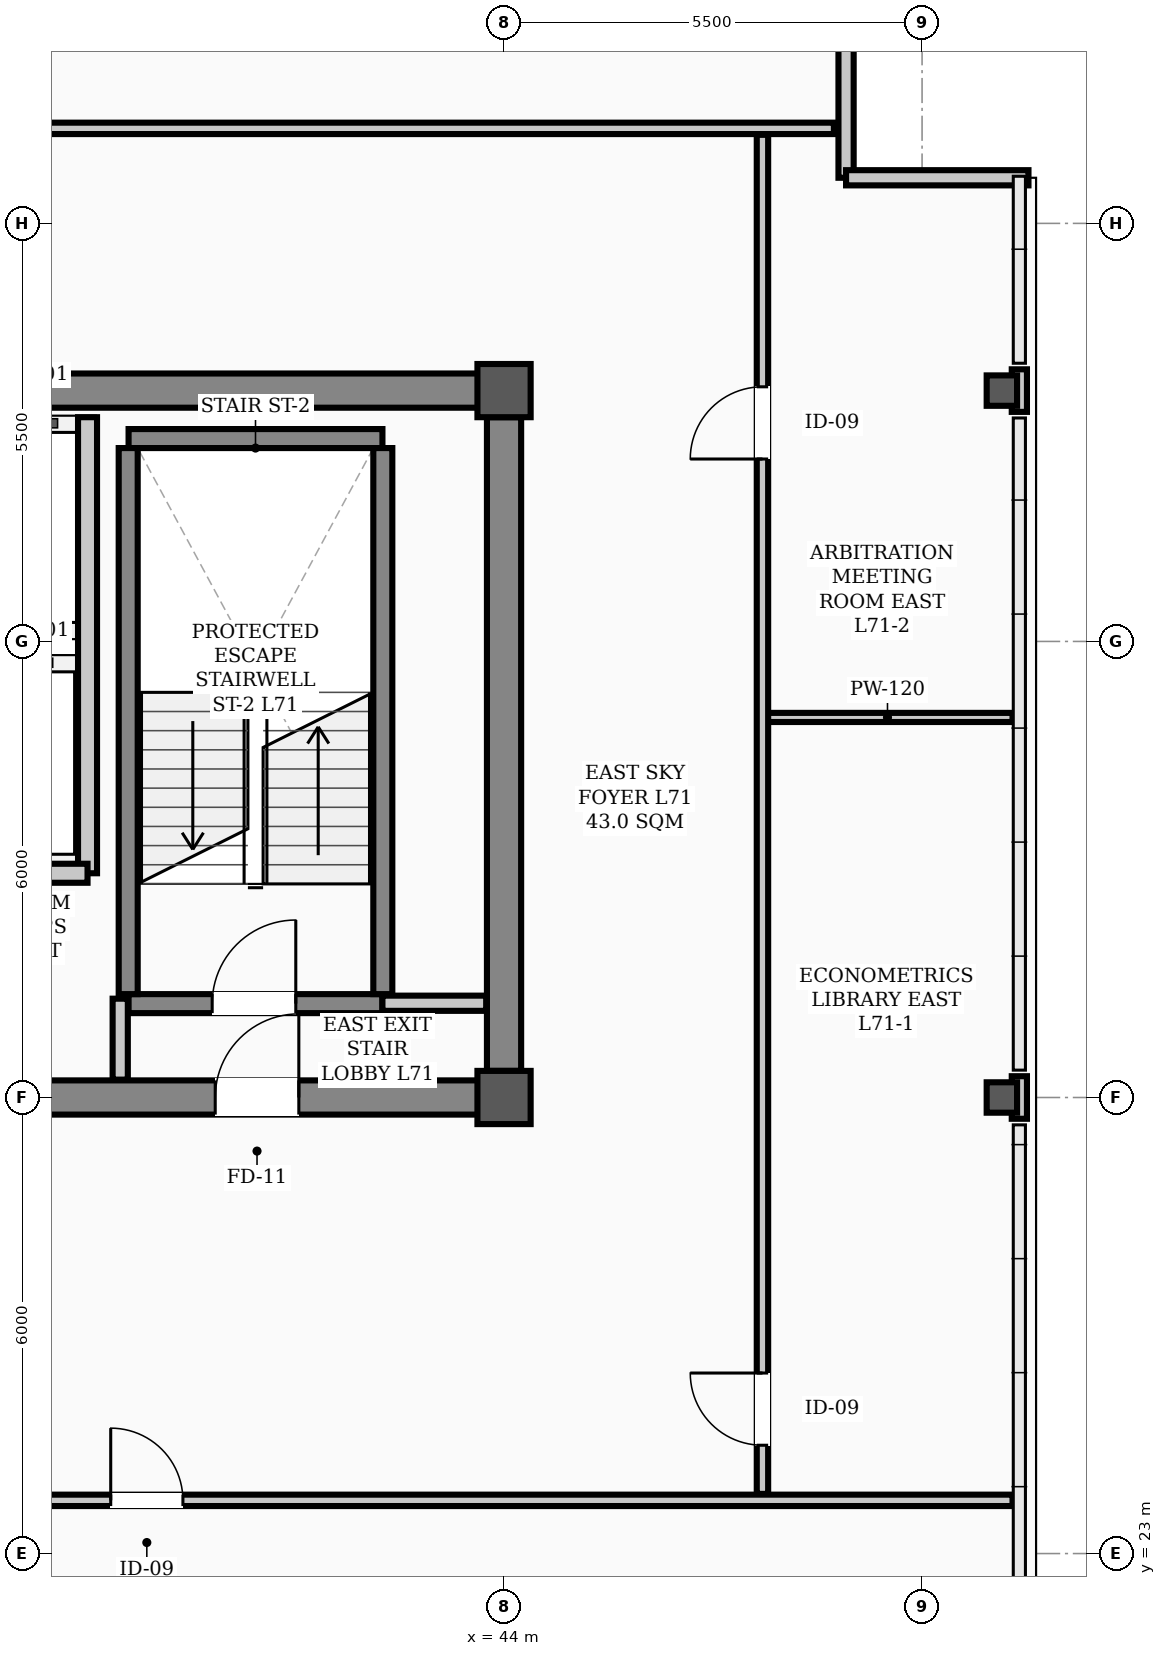
"""IFC4 building model, lengths in metres.
Left out: names, types, materials, properties, quantities, classifications, styles, units other than length and angle.
Written with IfcOpenShell. Run it as: python <this file> out.ifc"""

import sys

from ifc_helpers import new_model, si_unit, direction, frame, frame_2d, origin, origin_2d, place, context, subcontext, project, spatial, rectangle, hollow_rectangle, extrude, element, fill, save


model = new_model("IFC4")
c1 = context("Model", 3, precision=1e-05, world=origin(), true_north=direction((0.0, 1.0)))
c2 = subcontext(c1, "Body", "Model", "MODEL_VIEW")
j1 = project(units=[si_unit("LENGTHUNIT", "METRE"), si_unit("PLANEANGLEUNIT", "RADIAN")], contexts=[c1])
p1 = place(None, origin())
s1 = spatial("IfcSite", under=j1, at=p1, CompositionType="ELEMENT")
p2 = place(p1, origin())
s2 = spatial("IfcBuilding", under=s1, at=p2, CompositionType="ELEMENT")
p3 = place(p2, frame((0.0, 0.0, 285.2)))
s3 = spatial("IfcBuildingStorey", under=s2, at=p3, CompositionType="ELEMENT", Elevation=285.2)
for number, where, z_axis, x_axis in (
    (1, (44.0, 29.0, 0.0), (0.0, 0.0, 1.0), (1.0, 0.0, 0.0)),
    (2, (44.0, 38.3, 0.0), (0.0, 0.0, 1.0), (1.0, 0.0, 0.0)),
):
    element("IfcColumn", number, at=place(p3, frame(where, z_axis=z_axis, x_axis=x_axis)), inside=s3, PredefinedType="COLUMN", context=c2, shape_type="SweptSolid", body=[
        extrude(hollow_rectangle(XDim=0.7, YDim=0.7, WallThickness=0.028, InnerFilletRadius=0.014, OuterFilletRadius=0.042, at=origin_2d()), origin(), (0.0, 0.0, 1.0), 3.9),
    ])
for number, where, z_axis, x_axis in (
    (3, (50.55, 29.0, 0.0), (0.0, 0.0, 1.0), (1.0, 0.0, 0.0)),
    (4, (50.55, 38.3, 0.0), (0.0, 0.0, 1.0), (1.0, 0.0, 0.0)),
):
    element("IfcColumn", number, at=place(p3, frame(where, z_axis=z_axis, x_axis=x_axis)), inside=s3, PredefinedType="COLUMN", context=c2, shape_type="SweptSolid", body=[
        extrude(hollow_rectangle(XDim=0.4, YDim=0.4, WallThickness=0.02, InnerFilletRadius=0.02, OuterFilletRadius=0.04, at=origin_2d()), origin(), (0.0, 0.0, 1.0), 3.9),
    ])
for number, where, z_axis, x_axis in (
    (5, (50.78, 28.72, 0.0), (0.0, 0.0, 1.0), (0.0, 1.0, 0.0)),
    (6, (50.78, 38.02, 0.0), (0.0, 0.0, 1.0), (0.0, 1.0, 0.0)),
):
    element("IfcWall", number, at=place(p3, frame(where, z_axis=z_axis, x_axis=x_axis)), inside=s3, PredefinedType="PARAPET", context=c2, shape_type="SweptSolid", body=[
        extrude(rectangle(XDim=0.56, YDim=0.2, at=frame_2d((0.28, 0.0))), origin(), (0.0, 0.0, 1.0), 1.2),
    ])
for number, where, z_axis, x_axis in (
    (7, (48.5, 43.5, 0.0), (0.0, 0.0, 1.0), (0.0, -1.0, 0.0)),
    (8, (48.5, 41.1, 0.0), (0.0, 0.0, 1.0), (1.0, 0.0, 0.0)),
):
    element("IfcWall", number, at=place(p3, frame(where, z_axis=z_axis, x_axis=x_axis)), inside=s3, PredefinedType="PARAPET", context=c2, shape_type="SweptSolid", body=[
        extrude(rectangle(XDim=2.4, YDim=0.2, at=frame_2d((1.2, 0.0))), origin(), (0.0, 0.0, 1.0), 1.2),
    ])
p4 = place(p3, frame((13.5, 29.0, 0.0), z_axis=(0.0, 0.0, 1.0), x_axis=(1.0, 0.0, 0.0)))
e9 = element("IfcWall", 9, at=p4, inside=s3, PredefinedType="SHEAR", context=c2, shape_type="SweptSolid", body=[
    extrude(rectangle(XDim=30.5, YDim=0.45, at=frame_2d((15.25, 0.0))), origin(), (0.0, 0.0, 1.0), 3.72),
])
p5 = place(p4, frame((1.75, 0.0, 0.0)))
e10 = element("IfcOpeningElement", 10, at=p5, cuts=e9, PredefinedType="OPENING", context=c2, shape_type="SweptSolid", body=[
    extrude(rectangle(XDim=1.1, YDim=2.08, at=frame_2d((0.55, 1.04))), frame((0.0, 0.235, 0.0), z_axis=(0.0, -1.0, 0.0), x_axis=(1.0, 0.0, 0.0)), (0.0, 0.0, 1.0), 0.47),
])
p6 = place(p4, frame((26.7, 0.0, 0.0)))
e11 = element("IfcOpeningElement", 11, at=p6, cuts=e9, PredefinedType="OPENING", context=c2, shape_type="SweptSolid", body=[
    extrude(rectangle(XDim=1.1, YDim=2.08, at=frame_2d((0.55, 1.04))), frame((0.0, 0.235, 0.0), z_axis=(0.0, -1.0, 0.0), x_axis=(1.0, 0.0, 0.0)), (0.0, 0.0, 1.0), 0.47),
])
p7 = place(p4, frame((6.8, 0.0, 0.0)))
e12 = element("IfcOpeningElement", 12, at=p7, cuts=e9, PredefinedType="OPENING", context=c2, shape_type="SweptSolid", body=[
    extrude(rectangle(XDim=1.1, YDim=2.08, at=frame_2d((0.55, 1.04))), frame((0.0, 0.235, 0.0), z_axis=(0.0, -1.0, 0.0), x_axis=(1.0, 0.0, 0.0)), (0.0, 0.0, 1.0), 0.47),
])
p8 = place(p4, frame((13.2, 0.0, 0.0)))
e13 = element("IfcOpeningElement", 13, at=p8, cuts=e9, PredefinedType="OPENING", context=c2, shape_type="SweptSolid", body=[
    extrude(rectangle(XDim=1.6, YDim=2.08, at=frame_2d((0.8, 1.04))), frame((0.0, 0.235, 0.0), z_axis=(0.0, -1.0, 0.0), x_axis=(1.0, 0.0, 0.0)), (0.0, 0.0, 1.0), 0.47),
])
p9 = place(p4, frame((19.6, 0.0, 0.0)))
e14 = element("IfcOpeningElement", 14, at=p9, cuts=e9, PredefinedType="OPENING", context=c2, shape_type="SweptSolid", body=[
    extrude(rectangle(XDim=0.9, YDim=2.08, at=frame_2d((0.45, 1.04))), frame((0.0, 0.235, 0.0), z_axis=(0.0, -1.0, 0.0), x_axis=(1.0, 0.0, 0.0)), (0.0, 0.0, 1.0), 0.47),
])
p10 = place(p4, frame((21.6, 0.0, 0.0)))
e15 = element("IfcOpeningElement", 15, at=p10, cuts=e9, PredefinedType="OPENING", context=c2, shape_type="SweptSolid", body=[
    extrude(rectangle(XDim=0.9, YDim=2.08, at=frame_2d((0.45, 1.04))), frame((0.0, 0.235, 0.0), z_axis=(0.0, -1.0, 0.0), x_axis=(1.0, 0.0, 0.0)), (0.0, 0.0, 1.0), 0.47),
])
p11 = place(p3, frame((13.5, 38.3, 0.0), z_axis=(0.0, 0.0, 1.0), x_axis=(1.0, 0.0, 0.0)))
e16 = element("IfcWall", 16, at=p11, inside=s3, PredefinedType="SHEAR", context=c2, shape_type="SweptSolid", body=[
    extrude(rectangle(XDim=30.5, YDim=0.45, at=frame_2d((15.25, 0.0))), origin(), (0.0, 0.0, 1.0), 3.72),
])
p12 = place(p3, frame((44.0, 29.35, 0.0), z_axis=(0.0, 0.0, 1.0), x_axis=(0.0, 1.0, 0.0)))
e17 = element("IfcWall", 17, at=p12, inside=s3, PredefinedType="SHEAR", context=c2, shape_type="SweptSolid", body=[
    extrude(rectangle(XDim=8.6, YDim=0.45, at=frame_2d((4.3, 0.0))), origin(), (0.0, 0.0, 1.0), 3.72),
])
p13 = place(p3, frame((39.06, 30.235, 0.0), z_axis=(0.0, 0.0, 1.0), x_axis=(1.0, 0.0, 0.0)))
e18 = element("IfcWall", 18, at=p13, inside=s3, PredefinedType="STANDARD", context=c2, shape_type="SweptSolid", body=[
    extrude(rectangle(XDim=3.34, YDim=0.25, at=frame_2d((1.67, 0.0))), origin(), (0.0, 0.0, 1.0), 3.72),
])
p14 = place(p13, frame((1.1, 0.0, 0.0)))
e19 = element("IfcOpeningElement", 19, at=p14, cuts=e18, PredefinedType="OPENING", context=c2, shape_type="SweptSolid", body=[
    extrude(rectangle(XDim=1.1, YDim=2.08, at=frame_2d((0.55, 1.04))), frame((0.0, 0.135, 0.0), z_axis=(0.0, -1.0, 0.0), x_axis=(1.0, 0.0, 0.0)), (0.0, 0.0, 1.0), 0.27),
])
p15 = place(p3, frame((39.06, 37.669, 0.0), z_axis=(0.0, 0.0, 1.0), x_axis=(1.0, 0.0, 0.0)))
e20 = element("IfcWall", 20, at=p15, inside=s3, PredefinedType="STANDARD", context=c2, shape_type="SweptSolid", body=[
    extrude(rectangle(XDim=3.34, YDim=0.25, at=frame_2d((1.67, 0.0))), origin(), (0.0, 0.0, 1.0), 3.72),
])
for number, where, z_axis, x_axis in (
    (21, (39.055, 30.36, 0.0), (0.0, 0.0, 1.0), (0.0, 1.0, 0.0)),
    (22, (42.405, 30.36, 0.0), (0.0, 0.0, 1.0), (0.0, 1.0, 0.0)),
):
    element("IfcWall", number, at=place(p3, frame(where, z_axis=z_axis, x_axis=x_axis)), inside=s3, PredefinedType="STANDARD", context=c2, shape_type="SweptSolid", body=[
        extrude(rectangle(XDim=7.184, YDim=0.25, at=frame_2d((3.592, 0.0))), origin(), (0.0, 0.0, 1.0), 3.72),
    ])
p16 = place(p3, frame((38.52, 31.95, 0.0), z_axis=(0.0, 0.0, 1.0), x_axis=(0.0, 1.0, 0.0)))
e23 = element("IfcWall", 23, at=p16, inside=s3, PredefinedType="STANDARD", context=c2, shape_type="SweptSolid", body=[
    extrude(rectangle(XDim=6.0, YDim=0.25, at=frame_2d((3.0, 0.0))), origin(), (0.0, 0.0, 1.0), 3.4),
])
p17 = place(p3, frame((36.62, 31.95, 0.0), z_axis=(0.0, 0.0, 1.0), x_axis=(1.0, 0.0, 0.0)))
e24 = element("IfcWall", 24, at=p17, inside=s3, PredefinedType="STANDARD", context=c2, shape_type="SweptSolid", body=[
    extrude(rectangle(XDim=1.9, YDim=0.25, at=frame_2d((0.95, 0.0))), origin(), (0.0, 0.0, 1.0), 3.48),
])
p18 = place(p3, frame((42.4, 30.24, 0.0), z_axis=(0.0, 0.0, 1.0), x_axis=(1.0, 0.0, 0.0)))
e25 = element("IfcWall", 25, at=p18, inside=s3, PredefinedType="STANDARD", context=c2, shape_type="SweptSolid", body=[
    extrude(rectangle(XDim=1.365, YDim=0.2, at=frame_2d((0.683, 0.0))), origin(), (0.0, 0.0, 1.0), 3.2),
])
p19 = place(p3, frame((12.31, 23.7, 0.0), z_axis=(0.0, 0.0, 1.0), x_axis=(1.0, 0.0, 0.0)))
e26 = element("IfcWall", 26, at=p19, inside=s3, PredefinedType="PARTITIONING", context=c2, shape_type="SweptSolid", body=[
    extrude(rectangle(XDim=38.38, YDim=0.15, at=frame_2d((19.19, 0.0))), origin(), (0.0, 0.0, 1.0), 3.2),
])
p20 = place(p19, frame((8.97, 0.0, 0.0)))
e27 = element("IfcOpeningElement", 27, at=p20, cuts=e26, PredefinedType="OPENING", context=c2, shape_type="SweptSolid", body=[
    extrude(rectangle(XDim=0.95, YDim=2.08, at=frame_2d((0.475, 1.04))), frame((0.0, 0.085, 0.0), z_axis=(0.0, -1.0, 0.0), x_axis=(1.0, 0.0, 0.0)), (0.0, 0.0, 1.0), 0.17),
])
p21 = place(p19, frame((26.515, 0.0, 0.0)))
e28 = element("IfcOpeningElement", 28, at=p21, cuts=e26, PredefinedType="OPENING", context=c2, shape_type="SweptSolid", body=[
    extrude(rectangle(XDim=0.95, YDim=2.08, at=frame_2d((0.475, 1.04))), frame((0.0, 0.085, 0.0), z_axis=(0.0, -1.0, 0.0), x_axis=(1.0, 0.0, 0.0)), (0.0, 0.0, 1.0), 0.17),
])
p22 = place(p3, frame((47.4, 34.0, 0.0), z_axis=(0.0, 0.0, 1.0), x_axis=(1.0, 0.0, 0.0)))
e29 = element("IfcWall", 29, at=p22, inside=s3, PredefinedType="PARTITIONING", context=c2, shape_type="SweptSolid", body=[
    extrude(rectangle(XDim=3.29, YDim=0.12, at=frame_2d((1.645, 0.0))), origin(), (0.0, 0.0, 1.0), 3.212),
])
p23 = place(p3, frame((14.66, 41.75, 0.0), z_axis=(0.0, 0.0, 1.0), x_axis=(1.0, 0.0, 0.0)))
e30 = element("IfcWall", 30, at=p23, inside=s3, PredefinedType="PARTITIONING", context=c2, shape_type="SweptSolid", body=[
    extrude(rectangle(XDim=33.68, YDim=0.15, at=frame_2d((16.84, 0.0))), origin(), (0.0, 0.0, 1.0), 3.2),
])
p24 = place(p3, frame((38.95, 29.235, 0.0), z_axis=(0.0, 0.0, 1.0), x_axis=(0.0, 1.0, 0.0)))
e31 = element("IfcWall", 31, at=p24, inside=s3, PredefinedType="STANDARD", context=c2, shape_type="SweptSolid", body=[
    extrude(rectangle(XDim=1.065, YDim=0.2, at=frame_2d((0.532, 0.0))), origin(), (0.0, 0.0, 1.0), 3.4),
])
p25 = place(p3, frame((47.4, 23.785, 0.0), z_axis=(0.0, 0.0, 1.0), x_axis=(0.0, 1.0, 0.0)))
e32 = element("IfcWall", 32, at=p25, inside=s3, PredefinedType="PARTITIONING", context=c2, shape_type="SweptSolid", body=[
    extrude(rectangle(XDim=17.88, YDim=0.15, at=frame_2d((8.94, 0.0))), origin(), (0.0, 0.0, 1.0), 3.1),
])
p26 = place(p25, frame((0.64, 0.0, 0.0)))
e33 = element("IfcOpeningElement", 33, at=p26, cuts=e32, PredefinedType="OPENING", context=c2, shape_type="SweptSolid", body=[
    extrude(rectangle(XDim=0.95, YDim=2.08, at=frame_2d((0.475, 1.04))), frame((0.0, 0.085, 0.0), z_axis=(0.0, -1.0, 0.0), x_axis=(1.0, 0.0, 0.0)), (0.0, 0.0, 1.0), 0.17),
])
p27 = place(p25, frame((13.615, 0.0, 0.0)))
e34 = element("IfcOpeningElement", 34, at=p27, cuts=e32, PredefinedType="OPENING", context=c2, shape_type="SweptSolid", body=[
    extrude(rectangle(XDim=0.95, YDim=2.08, at=frame_2d((0.475, 1.04))), frame((0.0, 0.085, 0.0), z_axis=(0.0, -1.0, 0.0), x_axis=(1.0, 0.0, 0.0)), (0.0, 0.0, 1.0), 0.17),
])
p28 = place(p14, origin())
e35 = element("IfcDoor", 35, at=p28, inside=s3, OperationType="SINGLE_SWING_RIGHT", PredefinedType="DOOR", context=c2, shape_type="SweptSolid", body=[
    extrude(rectangle(XDim=1.1, YDim=2.08, at=frame_2d((0.55, 1.04))), frame((0.0, 0.025, 0.0), z_axis=(0.0, -1.0, 0.0), x_axis=(1.0, 0.0, 0.0)), (0.0, 0.0, 1.0), 0.05),
])
fill(e19, e35)
p29 = place(p6, origin())
e36 = element("IfcDoor", 36, at=p29, inside=s3, OperationType="SINGLE_SWING_RIGHT", PredefinedType="DOOR", context=c2, shape_type="SweptSolid", body=[
    extrude(rectangle(XDim=1.1, YDim=2.08, at=frame_2d((0.55, 1.04))), frame((0.0, 0.025, 0.0), z_axis=(0.0, -1.0, 0.0), x_axis=(1.0, 0.0, 0.0)), (0.0, 0.0, 1.0), 0.05),
])
fill(e11, e36)
p30 = place(p21, origin())
e37 = element("IfcDoor", 37, at=p30, inside=s3, OperationType="SINGLE_SWING_LEFT", PredefinedType="DOOR", context=c2, shape_type="SweptSolid", body=[
    extrude(rectangle(XDim=0.95, YDim=2.08, at=frame_2d((0.475, 1.04))), frame((0.0, 0.025, 0.0), z_axis=(0.0, -1.0, 0.0), x_axis=(1.0, 0.0, 0.0)), (0.0, 0.0, 1.0), 0.05),
])
fill(e28, e37)
p31 = place(p26, origin())
e38 = element("IfcDoor", 38, at=p31, inside=s3, OperationType="SINGLE_SWING_RIGHT", PredefinedType="DOOR", context=c2, shape_type="SweptSolid", body=[
    extrude(rectangle(XDim=0.95, YDim=2.08, at=frame_2d((0.475, 1.04))), frame((0.0, 0.025, 0.0), z_axis=(0.0, -1.0, 0.0), x_axis=(1.0, 0.0, 0.0)), (0.0, 0.0, 1.0), 0.05),
])
fill(e33, e38)
p32 = place(p27, origin())
e39 = element("IfcDoor", 39, at=p32, inside=s3, OperationType="SINGLE_SWING_LEFT", PredefinedType="DOOR", context=c2, shape_type="SweptSolid", body=[
    extrude(rectangle(XDim=0.95, YDim=2.08, at=frame_2d((0.475, 1.04))), frame((0.0, 0.025, 0.0), z_axis=(0.0, -1.0, 0.0), x_axis=(1.0, 0.0, 0.0)), (0.0, 0.0, 1.0), 0.05),
])
fill(e34, e39)
save(model, sys.argv[1])
